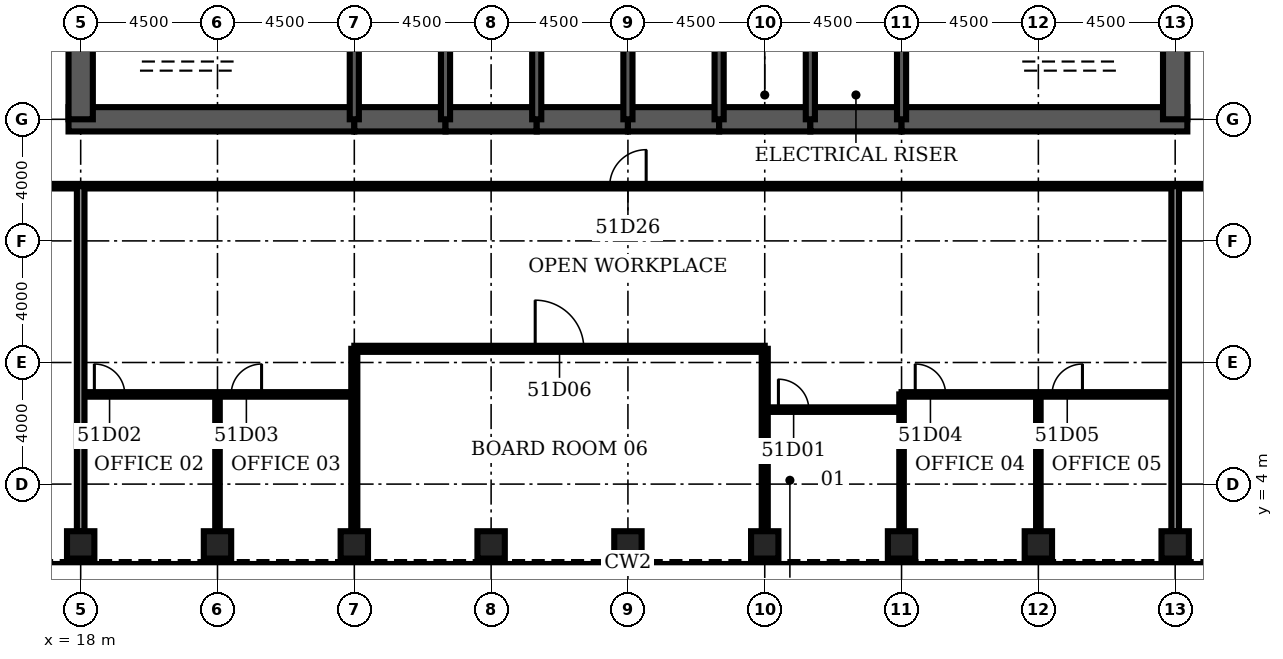
"""IFC4 building model, lengths in metres.
Left out: names, types, materials, properties, quantities, classifications, styles, units other than length and angle.
Written with IfcOpenShell. Run it as: python <this file> out.ifc"""

import sys

from ifc_helpers import new_model, si_unit, direction, frame, frame_2d, origin, origin_2d, place, context, subcontext, project, spatial, rectangle, hollow_rectangle, extrude, element, fill, save


model = new_model("IFC4")
c1 = context("Model", 3, precision=1e-05, world=origin(), true_north=direction((0.0, 1.0)))
c2 = subcontext(c1, "Body", "Model", "MODEL_VIEW")
j1 = project(units=[si_unit("LENGTHUNIT", "METRE"), si_unit("PLANEANGLEUNIT", "RADIAN")], contexts=[c1])
p1 = place(None, origin())
s1 = spatial("IfcSite", under=j1, at=p1, CompositionType="ELEMENT")
p2 = place(p1, origin())
s2 = spatial("IfcBuilding", under=s1, at=p2, CompositionType="ELEMENT")
p3 = place(p2, frame((0.0, 0.0, 227.8)))
s3 = spatial("IfcBuildingStorey", under=s2, at=p3, CompositionType="ELEMENT", Elevation=227.8)
for number, where, z_axis, x_axis in (
    (1, (18.0, 2.0, 0.0), (0.0, 0.0, 1.0), (0.0, 1.0, 0.0)),
    (2, (22.5, 2.0, 0.0), (0.0, 0.0, 1.0), (0.0, 1.0, 0.0)),
    (3, (27.0, 2.0, 0.0), (0.0, 0.0, 1.0), (0.0, 1.0, 0.0)),
    (4, (31.5, 2.0, 0.0), (0.0, 0.0, 1.0), (0.0, 1.0, 0.0)),
    (5, (36.0, 2.0, 0.0), (0.0, 0.0, 1.0), (0.0, 1.0, 0.0)),
    (6, (40.5, 2.0, 0.0), (0.0, 0.0, 1.0), (0.0, 1.0, 0.0)),
    (7, (45.0, 2.0, 0.0), (0.0, 0.0, 1.0), (0.0, 1.0, 0.0)),
    (8, (49.5, 2.0, 0.0), (0.0, 0.0, 1.0), (0.0, 1.0, 0.0)),
    (9, (54.0, 2.0, 0.0), (0.0, 0.0, 1.0), (0.0, 1.0, 0.0)),
):
    element("IfcColumn", number, at=place(p3, frame(where, z_axis=z_axis, x_axis=x_axis)), inside=s3, PredefinedType="COLUMN", context=c2, shape_type="SweptSolid", body=[
        extrude(hollow_rectangle(XDim=0.9, YDim=0.9, WallThickness=0.08, at=origin_2d()), origin(), (0.0, 0.0, 1.0), 4.2),
    ])
p4 = place(p3, frame((17.6, 16.0, 0.0), z_axis=(0.0, 0.0, 1.0), x_axis=(1.0, 0.0, 0.0)))
e10 = element("IfcWall", 10, at=p4, inside=s3, PredefinedType="SHEAR", context=c2, shape_type="SweptSolid", body=[
    extrude(rectangle(XDim=9.4, YDim=0.8, at=frame_2d((4.7, 0.0))), origin(), (0.0, 0.0, 1.0), 4.2),
])
for number, where, z_axis, x_axis in (
    (11, (27.0, 16.0, 0.0), (0.0, 0.0, 1.0), (1.0, 0.0, 0.0)),
    (12, (30.0, 16.0, 0.0), (0.0, 0.0, 1.0), (1.0, 0.0, 0.0)),
    (13, (33.0, 16.0, 0.0), (0.0, 0.0, 1.0), (1.0, 0.0, 0.0)),
    (14, (36.0, 16.0, 0.0), (0.0, 0.0, 1.0), (1.0, 0.0, 0.0)),
    (15, (39.0, 16.0, 0.0), (0.0, 0.0, 1.0), (1.0, 0.0, 0.0)),
    (16, (42.0, 16.0, 0.0), (0.0, 0.0, 1.0), (1.0, 0.0, 0.0)),
):
    element("IfcWall", number, at=place(p3, frame(where, z_axis=z_axis, x_axis=x_axis)), inside=s3, PredefinedType="SHEAR", context=c2, shape_type="SweptSolid", body=[
        extrude(rectangle(XDim=3.0, YDim=0.8, at=frame_2d((1.5, 0.0))), origin(), (0.0, 0.0, 1.0), 4.2),
    ])
p5 = place(p3, frame((45.0, 16.0, 0.0), z_axis=(0.0, 0.0, 1.0), x_axis=(1.0, 0.0, 0.0)))
e17 = element("IfcWall", 17, at=p5, inside=s3, PredefinedType="SHEAR", context=c2, shape_type="SweptSolid", body=[
    extrude(rectangle(XDim=9.4, YDim=0.8, at=frame_2d((4.7, 0.0))), origin(), (0.0, 0.0, 1.0), 4.2),
])
for number, where, z_axis, x_axis in (
    (18, (18.0, 19.2, 0.0), (0.0, 0.0, 1.0), (0.0, -1.0, 0.0)),
    (19, (54.0, 16.0, 0.0), (0.0, 0.0, 1.0), (0.0, 1.0, 0.0)),
):
    element("IfcWall", number, at=place(p3, frame(where, z_axis=z_axis, x_axis=x_axis)), inside=s3, PredefinedType="SHEAR", context=c2, shape_type="SweptSolid", body=[
        extrude(rectangle(XDim=3.2, YDim=0.8, at=frame_2d((1.6, 0.0))), origin(), (0.0, 0.0, 1.0), 4.2),
    ])
for number, where, z_axis, x_axis in (
    (20, (27.0, 16.0, 0.0), (0.0, 0.0, 1.0), (0.0, 1.0, 0.0)),
    (21, (30.0, 16.0, 0.0), (0.0, 0.0, 1.0), (0.0, 1.0, 0.0)),
    (22, (33.0, 16.0, 0.0), (0.0, 0.0, 1.0), (0.0, 1.0, 0.0)),
    (23, (36.0, 16.0, 0.0), (0.0, 0.0, 1.0), (0.0, 1.0, 0.0)),
    (24, (39.0, 16.0, 0.0), (0.0, 0.0, 1.0), (0.0, 1.0, 0.0)),
    (25, (42.0, 16.0, 0.0), (0.0, 0.0, 1.0), (0.0, 1.0, 0.0)),
    (26, (45.0, 16.0, 0.0), (0.0, 0.0, 1.0), (0.0, 1.0, 0.0)),
):
    element("IfcWall", number, at=place(p3, frame(where, z_axis=z_axis, x_axis=x_axis)), inside=s3, PredefinedType="SOLIDWALL", context=c2, shape_type="SweptSolid", body=[
        extrude(rectangle(XDim=3.2, YDim=0.3, at=frame_2d((1.6, 0.0))), origin(), (0.0, 0.0, 1.0), 4.2),
    ])
p6 = place(p3, frame((39.15, 17.35, 0.0), z_axis=(0.0, 0.0, 1.0), x_axis=(1.0, 0.0, 0.0)))
e27 = element("IfcWall", 27, at=p6, inside=s3, PredefinedType="SOLIDWALL", context=c2, shape_type="SweptSolid", body=[
    extrude(rectangle(XDim=2.7, YDim=0.3, at=frame_2d((1.35, 0.0))), origin(), (0.0, 0.0, 1.0), 4.04),
])
p7 = place(p6, frame((0.85, 0.0, 0.0)))
e28 = element("IfcOpeningElement", 28, at=p7, cuts=e27, PredefinedType="OPENING", context=c2, shape_type="SweptSolid", body=[
    extrude(rectangle(XDim=1.0, YDim=2.1, at=frame_2d((0.5, 1.05))), frame((0.0, 0.16, 0.0), z_axis=(0.0, -1.0, 0.0), x_axis=(1.0, 0.0, 0.0)), (0.0, 0.0, 1.0), 0.32),
])
p8 = place(p3, frame((42.15, 17.35, 0.0), z_axis=(0.0, 0.0, 1.0), x_axis=(1.0, 0.0, 0.0)))
e29 = element("IfcWall", 29, at=p8, inside=s3, PredefinedType="SOLIDWALL", context=c2, shape_type="SweptSolid", body=[
    extrude(rectangle(XDim=2.7, YDim=0.3, at=frame_2d((1.35, 0.0))), origin(), (0.0, 0.0, 1.0), 4.04),
])
p9 = place(p8, frame((0.85, 0.0, 0.0)))
e30 = element("IfcOpeningElement", 30, at=p9, cuts=e29, PredefinedType="OPENING", context=c2, shape_type="SweptSolid", body=[
    extrude(rectangle(XDim=1.0, YDim=2.1, at=frame_2d((0.5, 1.05))), frame((0.0, 0.16, 0.0), z_axis=(0.0, -1.0, 0.0), x_axis=(1.0, 0.0, 0.0)), (0.0, 0.0, 1.0), 0.32),
])
p10 = place(p3, frame((40.5, 6.45, 0.0), z_axis=(0.0, 0.0, 1.0), x_axis=(1.0, 0.0, 0.0)))
e31 = element("IfcWall", 31, at=p10, inside=s3, PredefinedType="PARTITIONING", context=c2, shape_type="SweptSolid", body=[
    extrude(rectangle(XDim=4.5, YDim=0.15, at=frame_2d((2.25, 0.0))), origin(), (0.0, 0.0, 1.0), 3.0),
])
p11 = place(p10, frame((0.45, 0.0, 0.0)))
e32 = element("IfcOpeningElement", 32, at=p11, cuts=e31, PredefinedType="OPENING", context=c2, shape_type="SweptSolid", body=[
    extrude(rectangle(XDim=1.0, YDim=2.1, at=frame_2d((0.5, 1.05))), frame((0.0, 0.085, 0.0), z_axis=(0.0, -1.0, 0.0), x_axis=(1.0, 0.0, 0.0)), (0.0, 0.0, 1.0), 0.17),
])
p12 = place(p3, frame((18.0, 6.95, 0.0), z_axis=(0.0, 0.0, 1.0), x_axis=(1.0, 0.0, 0.0)))
e33 = element("IfcWall", 33, at=p12, inside=s3, PredefinedType="PARTITIONING", context=c2, shape_type="SweptSolid", body=[
    extrude(rectangle(XDim=9.0, YDim=0.15, at=frame_2d((4.5, 0.0))), origin(), (0.0, 0.0, 1.0), 3.0),
])
p13 = place(p12, frame((0.45, 0.0, 0.0)))
e34 = element("IfcOpeningElement", 34, at=p13, cuts=e33, PredefinedType="OPENING", context=c2, shape_type="SweptSolid", body=[
    extrude(rectangle(XDim=1.0, YDim=2.1, at=frame_2d((0.5, 1.05))), frame((0.0, 0.085, 0.0), z_axis=(0.0, -1.0, 0.0), x_axis=(1.0, 0.0, 0.0)), (0.0, 0.0, 1.0), 0.17),
])
p14 = place(p12, frame((4.95, 0.0, 0.0)))
e35 = element("IfcOpeningElement", 35, at=p14, cuts=e33, PredefinedType="OPENING", context=c2, shape_type="SweptSolid", body=[
    extrude(rectangle(XDim=1.0, YDim=2.1, at=frame_2d((0.5, 1.05))), frame((0.0, 0.085, 0.0), z_axis=(0.0, -1.0, 0.0), x_axis=(1.0, 0.0, 0.0)), (0.0, 0.0, 1.0), 0.17),
])
p15 = place(p3, frame((45.0, 6.95, 0.0), z_axis=(0.0, 0.0, 1.0), x_axis=(1.0, 0.0, 0.0)))
e36 = element("IfcWall", 36, at=p15, inside=s3, PredefinedType="PARTITIONING", context=c2, shape_type="SweptSolid", body=[
    extrude(rectangle(XDim=9.0, YDim=0.15, at=frame_2d((4.5, 0.0))), origin(), (0.0, 0.0, 1.0), 3.0),
])
p16 = place(p15, frame((0.45, 0.0, 0.0)))
e37 = element("IfcOpeningElement", 37, at=p16, cuts=e36, PredefinedType="OPENING", context=c2, shape_type="SweptSolid", body=[
    extrude(rectangle(XDim=1.0, YDim=2.1, at=frame_2d((0.5, 1.05))), frame((0.0, 0.085, 0.0), z_axis=(0.0, -1.0, 0.0), x_axis=(1.0, 0.0, 0.0)), (0.0, 0.0, 1.0), 0.17),
])
p17 = place(p15, frame((4.95, 0.0, 0.0)))
e38 = element("IfcOpeningElement", 38, at=p17, cuts=e36, PredefinedType="OPENING", context=c2, shape_type="SweptSolid", body=[
    extrude(rectangle(XDim=1.0, YDim=2.1, at=frame_2d((0.5, 1.05))), frame((0.0, 0.085, 0.0), z_axis=(0.0, -1.0, 0.0), x_axis=(1.0, 0.0, 0.0)), (0.0, 0.0, 1.0), 0.17),
])
p18 = place(p3, frame((27.0, 8.45, 0.0), z_axis=(0.0, 0.0, 1.0), x_axis=(1.0, 0.0, 0.0)))
e39 = element("IfcWall", 39, at=p18, inside=s3, PredefinedType="PARTITIONING", context=c2, shape_type="SweptSolid", body=[
    extrude(rectangle(XDim=13.5, YDim=0.2, at=frame_2d((6.75, 0.0))), origin(), (0.0, 0.0, 1.0), 3.0),
])
p19 = place(p18, frame((5.95, 0.0, 0.0)))
e40 = element("IfcOpeningElement", 40, at=p19, cuts=e39, PredefinedType="OPENING", context=c2, shape_type="SweptSolid", body=[
    extrude(rectangle(XDim=1.6, YDim=2.1, at=frame_2d((0.8, 1.05))), frame((0.0, 0.11, 0.0), z_axis=(0.0, -1.0, 0.0), x_axis=(1.0, 0.0, 0.0)), (0.0, 0.0, 1.0), 0.22),
])
p20 = place(p3, frame((15.2, 13.8, 0.0), z_axis=(0.0, 0.0, 1.0), x_axis=(1.0, 0.0, 0.0)))
e41 = element("IfcWall", 41, at=p20, inside=s3, PredefinedType="PARTITIONING", context=c2, shape_type="SweptSolid", body=[
    extrude(rectangle(XDim=41.6, YDim=0.15, at=frame_2d((20.8, 0.0))), origin(), (0.0, 0.0, 1.0), 3.0),
])
p21 = place(p20, frame((20.2, 0.0, 0.0)))
e42 = element("IfcOpeningElement", 42, at=p21, cuts=e41, PredefinedType="OPENING", context=c2, shape_type="SweptSolid", body=[
    extrude(rectangle(XDim=1.2, YDim=2.1, at=frame_2d((0.6, 1.05))), frame((0.0, 0.085, 0.0), z_axis=(0.0, -1.0, 0.0), x_axis=(1.0, 0.0, 0.0)), (0.0, 0.0, 1.0), 0.17),
])
p22 = place(p3, frame((18.0, 2.45, 0.0), z_axis=(0.0, 0.0, 1.0), x_axis=(0.0, 1.0, 0.0)))
e43 = element("IfcWall", 43, at=p22, inside=s3, PredefinedType="PARTITIONING", context=c2, shape_type="SweptSolid", body=[
    extrude(rectangle(XDim=11.35, YDim=0.25, at=frame_2d((5.675, 0.0))), origin(), (0.0, 0.0, 1.0), 3.0),
])
p23 = place(p3, frame((22.5, 2.45, 0.0), z_axis=(0.0, 0.0, 1.0), x_axis=(0.0, 1.0, 0.0)))
e44 = element("IfcWall", 44, at=p23, inside=s3, PredefinedType="PARTITIONING", context=c2, shape_type="SweptSolid", body=[
    extrude(rectangle(XDim=4.5, YDim=0.15, at=frame_2d((2.25, 0.0))), origin(), (0.0, 0.0, 1.0), 3.0),
])
for number, where, z_axis, x_axis in (
    (45, (27.0, 2.45, 0.0), (0.0, 0.0, 1.0), (0.0, 1.0, 0.0)),
    (46, (40.5, 2.45, 0.0), (0.0, 0.0, 1.0), (0.0, 1.0, 0.0)),
):
    element("IfcWall", number, at=place(p3, frame(where, z_axis=z_axis, x_axis=x_axis)), inside=s3, PredefinedType="PARTITIONING", context=c2, shape_type="SweptSolid", body=[
        extrude(rectangle(XDim=6.0, YDim=0.2, at=frame_2d((3.0, 0.0))), origin(), (0.0, 0.0, 1.0), 3.0),
    ])
for number, where, z_axis, x_axis in (
    (47, (45.0, 2.45, 0.0), (0.0, 0.0, 1.0), (0.0, 1.0, 0.0)),
    (48, (49.5, 2.45, 0.0), (0.0, 0.0, 1.0), (0.0, 1.0, 0.0)),
):
    element("IfcWall", number, at=place(p3, frame(where, z_axis=z_axis, x_axis=x_axis)), inside=s3, PredefinedType="PARTITIONING", context=c2, shape_type="SweptSolid", body=[
        extrude(rectangle(XDim=4.5, YDim=0.15, at=frame_2d((2.25, 0.0))), origin(), (0.0, 0.0, 1.0), 3.0),
    ])
p24 = place(p3, frame((54.0, 2.45, 0.0), z_axis=(0.0, 0.0, 1.0), x_axis=(0.0, 1.0, 0.0)))
e49 = element("IfcWall", 49, at=p24, inside=s3, PredefinedType="PARTITIONING", context=c2, shape_type="SweptSolid", body=[
    extrude(rectangle(XDim=11.35, YDim=0.25, at=frame_2d((5.675, 0.0))), origin(), (0.0, 0.0, 1.0), 3.0),
])
p25 = place(p7, origin())
e50 = element("IfcDoor", 50, at=p25, inside=s3, OperationType="SINGLE_SWING_LEFT", PredefinedType="DOOR", context=c2, shape_type="SweptSolid", body=[
    extrude(rectangle(XDim=1.0, YDim=2.1, at=frame_2d((0.5, 1.05))), frame((0.0, 0.025, 0.0), z_axis=(0.0, -1.0, 0.0), x_axis=(1.0, 0.0, 0.0)), (0.0, 0.0, 1.0), 0.05),
])
fill(e28, e50)
p26 = place(p9, origin())
e51 = element("IfcDoor", 51, at=p26, inside=s3, OperationType="SINGLE_SWING_LEFT", PredefinedType="DOOR", context=c2, shape_type="SweptSolid", body=[
    extrude(rectangle(XDim=1.0, YDim=2.1, at=frame_2d((0.5, 1.05))), frame((0.0, 0.025, 0.0), z_axis=(0.0, -1.0, 0.0), x_axis=(1.0, 0.0, 0.0)), (0.0, 0.0, 1.0), 0.05),
])
fill(e30, e51)
p27 = place(p11, origin())
e52 = element("IfcDoor", 52, at=p27, inside=s3, OperationType="SINGLE_SWING_LEFT", PredefinedType="DOOR", context=c2, shape_type="SweptSolid", body=[
    extrude(rectangle(XDim=1.0, YDim=2.1, at=frame_2d((0.5, 1.05))), frame((0.0, 0.025, 0.0), z_axis=(0.0, -1.0, 0.0), x_axis=(1.0, 0.0, 0.0)), (0.0, 0.0, 1.0), 0.05),
])
fill(e32, e52)
p28 = place(p13, origin())
e53 = element("IfcDoor", 53, at=p28, inside=s3, OperationType="SINGLE_SWING_LEFT", PredefinedType="DOOR", context=c2, shape_type="SweptSolid", body=[
    extrude(rectangle(XDim=1.0, YDim=2.1, at=frame_2d((0.5, 1.05))), frame((0.0, 0.025, 0.0), z_axis=(0.0, -1.0, 0.0), x_axis=(1.0, 0.0, 0.0)), (0.0, 0.0, 1.0), 0.05),
])
fill(e34, e53)
p29 = place(p14, origin())
e54 = element("IfcDoor", 54, at=p29, inside=s3, OperationType="SINGLE_SWING_RIGHT", PredefinedType="DOOR", context=c2, shape_type="SweptSolid", body=[
    extrude(rectangle(XDim=1.0, YDim=2.1, at=frame_2d((0.5, 1.05))), frame((0.0, 0.025, 0.0), z_axis=(0.0, -1.0, 0.0), x_axis=(1.0, 0.0, 0.0)), (0.0, 0.0, 1.0), 0.05),
])
fill(e35, e54)
p30 = place(p16, origin())
e55 = element("IfcDoor", 55, at=p30, inside=s3, OperationType="SINGLE_SWING_LEFT", PredefinedType="DOOR", context=c2, shape_type="SweptSolid", body=[
    extrude(rectangle(XDim=1.0, YDim=2.1, at=frame_2d((0.5, 1.05))), frame((0.0, 0.025, 0.0), z_axis=(0.0, -1.0, 0.0), x_axis=(1.0, 0.0, 0.0)), (0.0, 0.0, 1.0), 0.05),
])
fill(e37, e55)
p31 = place(p17, origin())
e56 = element("IfcDoor", 56, at=p31, inside=s3, OperationType="SINGLE_SWING_RIGHT", PredefinedType="DOOR", context=c2, shape_type="SweptSolid", body=[
    extrude(rectangle(XDim=1.0, YDim=2.1, at=frame_2d((0.5, 1.05))), frame((0.0, 0.025, 0.0), z_axis=(0.0, -1.0, 0.0), x_axis=(1.0, 0.0, 0.0)), (0.0, 0.0, 1.0), 0.05),
])
fill(e38, e56)
p32 = place(p19, origin())
e57 = element("IfcDoor", 57, at=p32, inside=s3, OperationType="SINGLE_SWING_LEFT", PredefinedType="DOOR", context=c2, shape_type="SweptSolid", body=[
    extrude(rectangle(XDim=1.6, YDim=2.1, at=frame_2d((0.8, 1.05))), frame((0.0, 0.025, 0.0), z_axis=(0.0, -1.0, 0.0), x_axis=(1.0, 0.0, 0.0)), (0.0, 0.0, 1.0), 0.05),
])
fill(e40, e57)
p33 = place(p21, origin())
e58 = element("IfcDoor", 58, at=p33, inside=s3, OperationType="SINGLE_SWING_RIGHT", PredefinedType="DOOR", context=c2, shape_type="SweptSolid", body=[
    extrude(rectangle(XDim=1.2, YDim=2.1, at=frame_2d((0.6, 1.05))), frame((0.0, 0.025, 0.0), z_axis=(0.0, -1.0, 0.0), x_axis=(1.0, 0.0, 0.0)), (0.0, 0.0, 1.0), 0.05),
])
fill(e42, e58)
save(model, sys.argv[1])
